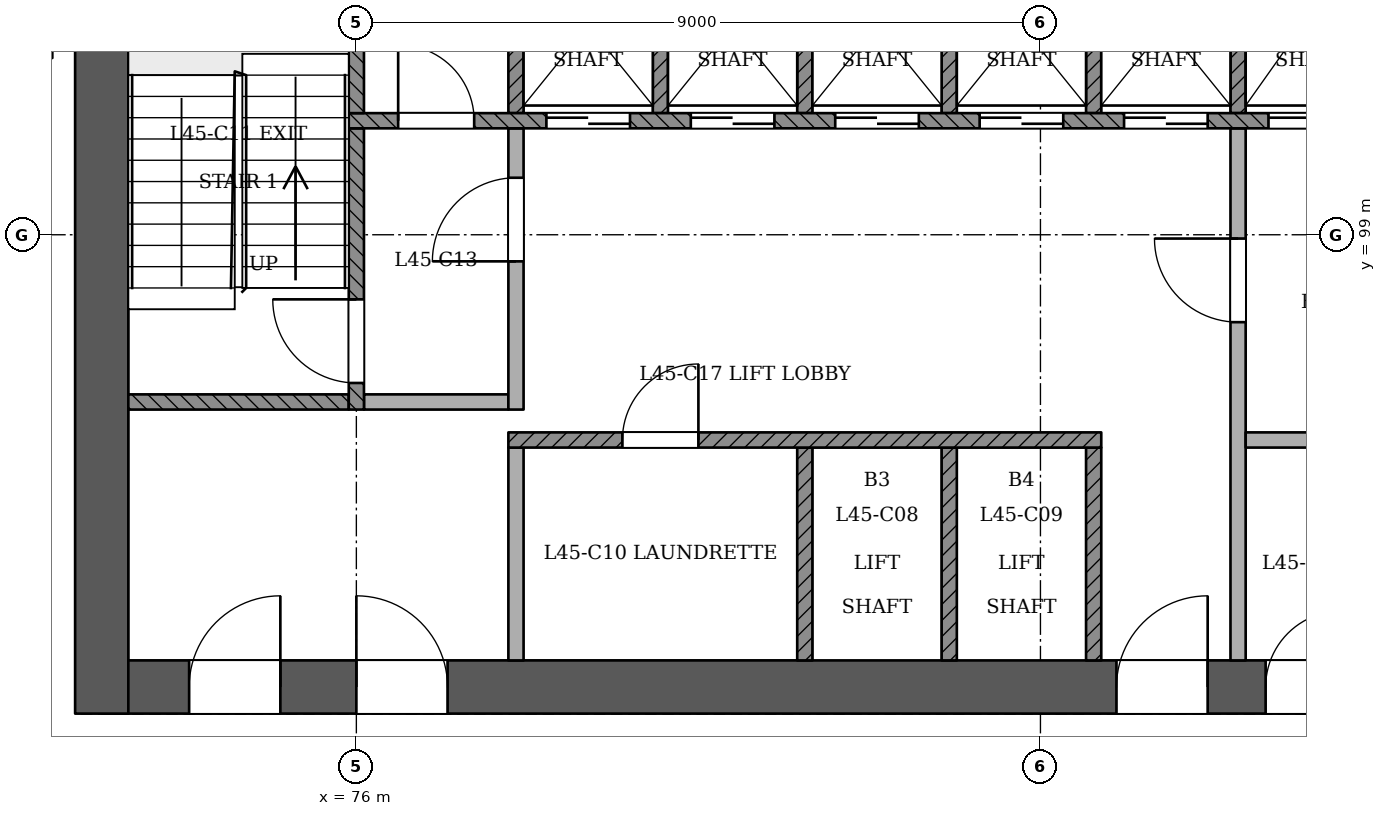
"""IFC4 building model, lengths in metres.
Left out: names, types, materials, properties, quantities, classifications, styles, units other than length and angle.
Written with IfcOpenShell. Run it as: python <this file> out.ifc"""

import sys

from ifc_helpers import new_model, si_unit, direction, frame, frame_2d, origin, place, context, subcontext, project, spatial, rectangle, extrude, element, fill, save


model = new_model("IFC4")
c1 = context("Model", 3, precision=1e-05, world=origin(), true_north=direction((0.0, 1.0)))
c2 = subcontext(c1, "Body", "Model", "MODEL_VIEW")
j1 = project(units=[si_unit("LENGTHUNIT", "METRE"), si_unit("PLANEANGLEUNIT", "RADIAN")], contexts=[c1])
p1 = place(None, origin())
s1 = spatial("IfcSite", under=j1, at=p1, CompositionType="ELEMENT")
p2 = place(p1, origin())
s2 = spatial("IfcBuilding", under=s1, at=p2, CompositionType="ELEMENT")
p3 = place(p2, frame((0.0, 0.0, 174.6)))
s3 = spatial("IfcBuildingStorey", under=s2, at=p3, CompositionType="ELEMENT", Elevation=174.6)
p4 = place(p3, frame((72.65, 93.05, 0.0), z_axis=(0.0, 0.0, 1.0), x_axis=(1.0, 0.0, 0.0)))
e1 = element("IfcWall", 1, at=p4, inside=s3, PredefinedType="SHEAR", context=c2, shape_type="SweptSolid", body=[
    extrude(rectangle(XDim=25.05, YDim=0.7, at=frame_2d((12.525, 0.0))), origin(), (0.0, 0.0, 1.0), 3.6),
])
p5 = place(p4, frame((1.15, 0.0, 0.0)))
e2 = element("IfcOpeningElement", 2, at=p5, cuts=e1, PredefinedType="OPENING", context=c2, shape_type="SweptSolid", body=[
    extrude(rectangle(XDim=1.2, YDim=2.1, at=frame_2d((0.6, 1.05))), frame((0.0, 0.36, 0.0), z_axis=(0.0, -1.0, 0.0), x_axis=(1.0, 0.0, 0.0)), (0.0, 0.0, 1.0), 0.721),
])
p6 = place(p4, frame((3.35, 0.0, 0.0)))
e3 = element("IfcOpeningElement", 3, at=p6, cuts=e1, PredefinedType="OPENING", context=c2, shape_type="SweptSolid", body=[
    extrude(rectangle(XDim=1.2, YDim=2.1, at=frame_2d((0.6, 1.05))), frame((0.0, 0.36, 0.0), z_axis=(0.0, -1.0, 0.0), x_axis=(1.0, 0.0, 0.0)), (0.0, 0.0, 1.0), 0.721),
])
p7 = place(p4, frame((13.35, 0.0, 0.0)))
e4 = element("IfcOpeningElement", 4, at=p7, cuts=e1, PredefinedType="OPENING", context=c2, shape_type="SweptSolid", body=[
    extrude(rectangle(XDim=1.2, YDim=2.1, at=frame_2d((0.6, 1.05))), frame((0.0, 0.36, 0.0), z_axis=(0.0, -1.0, 0.0), x_axis=(1.0, 0.0, 0.0)), (0.0, 0.0, 1.0), 0.721),
])
p8 = place(p4, frame((15.312, 0.0, 0.0)))
e5 = element("IfcOpeningElement", 5, at=p8, cuts=e1, PredefinedType="OPENING", context=c2, shape_type="SweptSolid", body=[
    extrude(rectangle(XDim=1.0, YDim=2.1, at=frame_2d((0.5, 1.05))), frame((0.0, 0.36, 0.0), z_axis=(0.0, -1.0, 0.0), x_axis=(1.0, 0.0, 0.0)), (0.0, 0.0, 1.0), 0.721),
])
p9 = place(p4, frame((18.15, 0.0, 0.0)))
e6 = element("IfcOpeningElement", 6, at=p9, cuts=e1, PredefinedType="OPENING", context=c2, shape_type="SweptSolid", body=[
    extrude(rectangle(XDim=1.0, YDim=2.1, at=frame_2d((0.5, 1.05))), frame((0.0, 0.36, 0.0), z_axis=(0.0, -1.0, 0.0), x_axis=(1.0, 0.0, 0.0)), (0.0, 0.0, 1.0), 0.721),
])
p10 = place(p4, frame((21.05, 0.0, 0.0)))
e7 = element("IfcOpeningElement", 7, at=p10, cuts=e1, PredefinedType="OPENING", context=c2, shape_type="SweptSolid", body=[
    extrude(rectangle(XDim=1.0, YDim=2.1, at=frame_2d((0.5, 1.05))), frame((0.0, 0.36, 0.0), z_axis=(0.0, -1.0, 0.0), x_axis=(1.0, 0.0, 0.0)), (0.0, 0.0, 1.0), 0.721),
])
p11 = place(p4, frame((22.938, 0.0, 0.0)))
e8 = element("IfcOpeningElement", 8, at=p11, cuts=e1, PredefinedType="OPENING", context=c2, shape_type="SweptSolid", body=[
    extrude(rectangle(XDim=1.0, YDim=2.1, at=frame_2d((0.5, 1.05))), frame((0.0, 0.36, 0.0), z_axis=(0.0, -1.0, 0.0), x_axis=(1.0, 0.0, 0.0)), (0.0, 0.0, 1.0), 0.721),
])
p12 = place(p3, frame((72.65, 103.75, 0.0), z_axis=(0.0, 0.0, 1.0), x_axis=(0.0, -1.0, 0.0)))
e9 = element("IfcWall", 9, at=p12, inside=s3, PredefinedType="SHEAR", context=c2, shape_type="SweptSolid", body=[
    extrude(rectangle(XDim=11.05, YDim=0.7, at=frame_2d((5.525, 0.0))), origin(), (0.0, 0.0, 1.0), 3.6),
])
p13 = place(p3, frame((78.1, 93.4, 0.0), z_axis=(0.0, 0.0, 1.0), x_axis=(0.0, 1.0, 0.0)))
e10 = element("IfcWall", 10, at=p13, inside=s3, PredefinedType="PARTITIONING", context=c2, shape_type="SweptSolid", body=[
    extrude(rectangle(XDim=2.8, YDim=0.2, at=frame_2d((1.4, 0.0))), origin(), (0.0, 0.0, 1.0), 3.15),
])
for number, where, z_axis, x_axis in (
    (11, (81.9, 93.4, 0.0), (0.0, 0.0, 1.0), (0.0, 1.0, 0.0)),
    (12, (83.8, 93.4, 0.0), (0.0, 0.0, 1.0), (0.0, 1.0, 0.0)),
    (13, (85.7, 93.4, 0.0), (0.0, 0.0, 1.0), (0.0, 1.0, 0.0)),
):
    element("IfcWall", number, at=place(p3, frame(where, z_axis=z_axis, x_axis=x_axis)), inside=s3, PredefinedType="SOLIDWALL", context=c2, shape_type="SweptSolid", body=[
        extrude(rectangle(XDim=2.8, YDim=0.2, at=frame_2d((1.4, 0.0))), origin(), (0.0, 0.0, 1.0), 3.15),
    ])
p14 = place(p3, frame((87.6, 93.4, 0.0), z_axis=(0.0, 0.0, 1.0), x_axis=(0.0, 1.0, 0.0)))
e14 = element("IfcWall", 14, at=p14, inside=s3, PredefinedType="PARTITIONING", context=c2, shape_type="SweptSolid", body=[
    extrude(rectangle(XDim=7.0, YDim=0.2, at=frame_2d((3.5, 0.0))), origin(), (0.0, 0.0, 1.0), 3.15),
])
p15 = place(p14, frame((4.45, 0.0, 0.0)))
e15 = element("IfcOpeningElement", 15, at=p15, cuts=e14, PredefinedType="OPENING", context=c2, shape_type="SweptSolid", body=[
    extrude(rectangle(XDim=1.1, YDim=2.1, at=frame_2d((0.55, 1.05))), frame((0.0, 0.11, 0.0), z_axis=(0.0, -1.0, 0.0), x_axis=(1.0, 0.0, 0.0)), (0.0, 0.0, 1.0), 0.221),
])
p16 = place(p3, frame((78.0, 96.3, 0.0), z_axis=(0.0, 0.0, 1.0), x_axis=(1.0, 0.0, 0.0)))
e16 = element("IfcWall", 16, at=p16, inside=s3, PredefinedType="SOLIDWALL", context=c2, shape_type="SweptSolid", body=[
    extrude(rectangle(XDim=7.8, YDim=0.2, at=frame_2d((3.9, 0.0))), origin(), (0.0, 0.0, 1.0), 3.15),
])
p17 = place(p16, frame((1.5, 0.0, 0.0)))
e17 = element("IfcOpeningElement", 17, at=p17, cuts=e16, PredefinedType="OPENING", context=c2, shape_type="SweptSolid", body=[
    extrude(rectangle(XDim=1.0, YDim=2.1, at=frame_2d((0.5, 1.05))), frame((0.0, 0.11, 0.0), z_axis=(0.0, -1.0, 0.0), x_axis=(1.0, 0.0, 0.0)), (0.0, 0.0, 1.0), 0.221),
])
p18 = place(p3, frame((87.7, 96.3, 0.0), z_axis=(0.0, 0.0, 1.0), x_axis=(1.0, 0.0, 0.0)))
e18 = element("IfcWall", 18, at=p18, inside=s3, PredefinedType="PARTITIONING", context=c2, shape_type="SweptSolid", body=[
    extrude(rectangle(XDim=3.6, YDim=0.2, at=frame_2d((1.8, 0.0))), origin(), (0.0, 0.0, 1.0), 3.15),
])
p19 = place(p3, frame((73.0, 96.8, 0.0), z_axis=(0.0, 0.0, 1.0), x_axis=(1.0, 0.0, 0.0)))
e19 = element("IfcWall", 19, at=p19, inside=s3, PredefinedType="SOLIDWALL", context=c2, shape_type="SweptSolid", body=[
    extrude(rectangle(XDim=2.9, YDim=0.2, at=frame_2d((1.45, 0.0))), origin(), (0.0, 0.0, 1.0), 3.15),
])
p20 = place(p3, frame((76.0, 96.7, 0.0), z_axis=(0.0, 0.0, 1.0), x_axis=(0.0, 1.0, 0.0)))
e20 = element("IfcWall", 20, at=p20, inside=s3, PredefinedType="SOLIDWALL", context=c2, shape_type="SweptSolid", body=[
    extrude(rectangle(XDim=3.7, YDim=0.2, at=frame_2d((1.85, 0.0))), origin(), (0.0, 0.0, 1.0), 3.15),
])
p21 = place(p20, frame((0.35, 0.0, 0.0)))
e21 = element("IfcOpeningElement", 21, at=p21, cuts=e20, PredefinedType="OPENING", context=c2, shape_type="SweptSolid", body=[
    extrude(rectangle(XDim=1.1, YDim=2.1, at=frame_2d((0.55, 1.05))), frame((0.0, 0.11, 0.0), z_axis=(0.0, -1.0, 0.0), x_axis=(1.0, 0.0, 0.0)), (0.0, 0.0, 1.0), 0.221),
])
p22 = place(p3, frame((76.1, 96.8, 0.0), z_axis=(0.0, 0.0, 1.0), x_axis=(1.0, 0.0, 0.0)))
e22 = element("IfcWall", 22, at=p22, inside=s3, PredefinedType="PARTITIONING", context=c2, shape_type="SweptSolid", body=[
    extrude(rectangle(XDim=1.9, YDim=0.2, at=frame_2d((0.95, 0.0))), origin(), (0.0, 0.0, 1.0), 3.15),
])
p23 = place(p3, frame((78.1, 96.7, 0.0), z_axis=(0.0, 0.0, 1.0), x_axis=(0.0, 1.0, 0.0)))
e23 = element("IfcWall", 23, at=p23, inside=s3, PredefinedType="PARTITIONING", context=c2, shape_type="SweptSolid", body=[
    extrude(rectangle(XDim=3.7, YDim=0.2, at=frame_2d((1.85, 0.0))), origin(), (0.0, 0.0, 1.0), 3.15),
])
p24 = place(p23, frame((1.95, 0.0, 0.0)))
e24 = element("IfcOpeningElement", 24, at=p24, cuts=e23, PredefinedType="OPENING", context=c2, shape_type="SweptSolid", body=[
    extrude(rectangle(XDim=1.1, YDim=2.1, at=frame_2d((0.55, 1.05))), frame((0.0, 0.11, 0.0), z_axis=(0.0, -1.0, 0.0), x_axis=(1.0, 0.0, 0.0)), (0.0, 0.0, 1.0), 0.221),
])
p25 = place(p3, frame((75.9, 100.5, 0.0), z_axis=(0.0, 0.0, 1.0), x_axis=(1.0, 0.0, 0.0)))
e25 = element("IfcWall", 25, at=p25, inside=s3, PredefinedType="SOLIDWALL", context=c2, shape_type="SweptSolid", body=[
    extrude(rectangle(XDim=18.2, YDim=0.2, at=frame_2d((9.1, 0.0))), origin(), (0.0, 0.0, 1.0), 3.15),
])
p26 = place(p25, frame((2.6, 0.0, 0.0)))
e26 = element("IfcOpeningElement", 26, at=p26, cuts=e25, PredefinedType="OPENING", context=c2, shape_type="SweptSolid", body=[
    extrude(rectangle(XDim=1.1, YDim=2.1, at=frame_2d((0.55, 1.05))), frame((0.0, 0.11, 0.0), z_axis=(0.0, -1.0, 0.0), x_axis=(1.0, 0.0, 0.0)), (0.0, 0.0, 1.0), 0.221),
])
p27 = place(p25, frame((4.5, 0.0, 0.0)))
e27 = element("IfcOpeningElement", 27, at=p27, cuts=e25, PredefinedType="OPENING", context=c2, shape_type="SweptSolid", body=[
    extrude(rectangle(XDim=1.1, YDim=2.1, at=frame_2d((0.55, 1.05))), frame((0.0, 0.11, 0.0), z_axis=(0.0, -1.0, 0.0), x_axis=(1.0, 0.0, 0.0)), (0.0, 0.0, 1.0), 0.221),
])
p28 = place(p25, frame((6.4, 0.0, 0.0)))
e28 = element("IfcOpeningElement", 28, at=p28, cuts=e25, PredefinedType="OPENING", context=c2, shape_type="SweptSolid", body=[
    extrude(rectangle(XDim=1.1, YDim=2.1, at=frame_2d((0.55, 1.05))), frame((0.0, 0.11, 0.0), z_axis=(0.0, -1.0, 0.0), x_axis=(1.0, 0.0, 0.0)), (0.0, 0.0, 1.0), 0.221),
])
p29 = place(p25, frame((8.3, 0.0, 0.0)))
e29 = element("IfcOpeningElement", 29, at=p29, cuts=e25, PredefinedType="OPENING", context=c2, shape_type="SweptSolid", body=[
    extrude(rectangle(XDim=1.1, YDim=2.1, at=frame_2d((0.55, 1.05))), frame((0.0, 0.11, 0.0), z_axis=(0.0, -1.0, 0.0), x_axis=(1.0, 0.0, 0.0)), (0.0, 0.0, 1.0), 0.221),
])
p30 = place(p25, frame((10.2, 0.0, 0.0)))
e30 = element("IfcOpeningElement", 30, at=p30, cuts=e25, PredefinedType="OPENING", context=c2, shape_type="SweptSolid", body=[
    extrude(rectangle(XDim=1.1, YDim=2.1, at=frame_2d((0.55, 1.05))), frame((0.0, 0.11, 0.0), z_axis=(0.0, -1.0, 0.0), x_axis=(1.0, 0.0, 0.0)), (0.0, 0.0, 1.0), 0.221),
])
p31 = place(p25, frame((12.1, 0.0, 0.0)))
e31 = element("IfcOpeningElement", 31, at=p31, cuts=e25, PredefinedType="OPENING", context=c2, shape_type="SweptSolid", body=[
    extrude(rectangle(XDim=1.1, YDim=2.1, at=frame_2d((0.55, 1.05))), frame((0.0, 0.11, 0.0), z_axis=(0.0, -1.0, 0.0), x_axis=(1.0, 0.0, 0.0)), (0.0, 0.0, 1.0), 0.221),
])
p32 = place(p25, frame((14.0, 0.0, 0.0)))
e32 = element("IfcOpeningElement", 32, at=p32, cuts=e25, PredefinedType="OPENING", context=c2, shape_type="SweptSolid", body=[
    extrude(rectangle(XDim=1.1, YDim=2.1, at=frame_2d((0.55, 1.05))), frame((0.0, 0.11, 0.0), z_axis=(0.0, -1.0, 0.0), x_axis=(1.0, 0.0, 0.0)), (0.0, 0.0, 1.0), 0.221),
])
p33 = place(p25, frame((0.65, 0.0, 0.0)))
e33 = element("IfcOpeningElement", 33, at=p33, cuts=e25, PredefinedType="OPENING", context=c2, shape_type="SweptSolid", body=[
    extrude(rectangle(XDim=1.0, YDim=2.1, at=frame_2d((0.5, 1.05))), frame((0.0, 0.11, 0.0), z_axis=(0.0, -1.0, 0.0), x_axis=(1.0, 0.0, 0.0)), (0.0, 0.0, 1.0), 0.221),
])
p34 = place(p25, frame((16.3, 0.0, 0.0)))
e34 = element("IfcOpeningElement", 34, at=p34, cuts=e25, PredefinedType="OPENING", context=c2, shape_type="SweptSolid", body=[
    extrude(rectangle(XDim=1.0, YDim=2.1, at=frame_2d((0.5, 1.05))), frame((0.0, 0.11, 0.0), z_axis=(0.0, -1.0, 0.0), x_axis=(1.0, 0.0, 0.0)), (0.0, 0.0, 1.0), 0.221),
])
for number, where, z_axis, x_axis in (
    (35, (76.0, 100.6, 0.0), (0.0, 0.0, 1.0), (0.0, 1.0, 0.0)),
    (36, (78.1, 100.6, 0.0), (0.0, 0.0, 1.0), (0.0, 1.0, 0.0)),
    (37, (80.0, 100.6, 0.0), (0.0, 0.0, 1.0), (0.0, 1.0, 0.0)),
    (38, (81.9, 100.6, 0.0), (0.0, 0.0, 1.0), (0.0, 1.0, 0.0)),
    (39, (83.8, 100.6, 0.0), (0.0, 0.0, 1.0), (0.0, 1.0, 0.0)),
    (40, (85.7, 100.6, 0.0), (0.0, 0.0, 1.0), (0.0, 1.0, 0.0)),
    (41, (87.6, 100.6, 0.0), (0.0, 0.0, 1.0), (0.0, 1.0, 0.0)),
):
    element("IfcWall", number, at=place(p3, frame(where, z_axis=z_axis, x_axis=x_axis)), inside=s3, PredefinedType="SOLIDWALL", context=c2, shape_type="SweptSolid", body=[
        extrude(rectangle(XDim=2.8, YDim=0.2, at=frame_2d((1.4, 0.0))), origin(), (0.0, 0.0, 1.0), 3.15),
    ])
p35 = place(p26, origin())
e42 = element("IfcDoor", 42, at=p35, inside=s3, OperationType="SLIDING_TO_RIGHT", PredefinedType="NOTDEFINED", context=c2, shape_type="SweptSolid", body=[
    extrude(rectangle(XDim=1.1, YDim=2.1, at=frame_2d((0.55, 1.05))), frame((0.0, 0.025, 0.0), z_axis=(0.0, -1.0, 0.0), x_axis=(1.0, 0.0, 0.0)), (0.0, 0.0, 1.0), 0.05),
])
fill(e26, e42)
p36 = place(p27, origin())
e43 = element("IfcDoor", 43, at=p36, inside=s3, OperationType="SLIDING_TO_LEFT", PredefinedType="NOTDEFINED", context=c2, shape_type="SweptSolid", body=[
    extrude(rectangle(XDim=1.1, YDim=2.1, at=frame_2d((0.55, 1.05))), frame((0.0, 0.025, 0.0), z_axis=(0.0, -1.0, 0.0), x_axis=(1.0, 0.0, 0.0)), (0.0, 0.0, 1.0), 0.05),
])
fill(e27, e43)
p37 = place(p28, origin())
e44 = element("IfcDoor", 44, at=p37, inside=s3, OperationType="SLIDING_TO_RIGHT", PredefinedType="NOTDEFINED", context=c2, shape_type="SweptSolid", body=[
    extrude(rectangle(XDim=1.1, YDim=2.1, at=frame_2d((0.55, 1.05))), frame((0.0, 0.025, 0.0), z_axis=(0.0, -1.0, 0.0), x_axis=(1.0, 0.0, 0.0)), (0.0, 0.0, 1.0), 0.05),
])
fill(e28, e44)
p38 = place(p29, origin())
e45 = element("IfcDoor", 45, at=p38, inside=s3, OperationType="SLIDING_TO_LEFT", PredefinedType="NOTDEFINED", context=c2, shape_type="SweptSolid", body=[
    extrude(rectangle(XDim=1.1, YDim=2.1, at=frame_2d((0.55, 1.05))), frame((0.0, 0.025, 0.0), z_axis=(0.0, -1.0, 0.0), x_axis=(1.0, 0.0, 0.0)), (0.0, 0.0, 1.0), 0.05),
])
fill(e29, e45)
p39 = place(p30, origin())
e46 = element("IfcDoor", 46, at=p39, inside=s3, OperationType="SLIDING_TO_RIGHT", PredefinedType="NOTDEFINED", context=c2, shape_type="SweptSolid", body=[
    extrude(rectangle(XDim=1.1, YDim=2.1, at=frame_2d((0.55, 1.05))), frame((0.0, 0.025, 0.0), z_axis=(0.0, -1.0, 0.0), x_axis=(1.0, 0.0, 0.0)), (0.0, 0.0, 1.0), 0.05),
])
fill(e30, e46)
p40 = place(p31, origin())
e47 = element("IfcDoor", 47, at=p40, inside=s3, OperationType="SLIDING_TO_RIGHT", PredefinedType="NOTDEFINED", context=c2, shape_type="SweptSolid", body=[
    extrude(rectangle(XDim=1.1, YDim=2.1, at=frame_2d((0.55, 1.05))), frame((0.0, 0.025, 0.0), z_axis=(0.0, -1.0, 0.0), x_axis=(1.0, 0.0, 0.0)), (0.0, 0.0, 1.0), 0.05),
])
fill(e31, e47)
p41 = place(p21, origin())
e48 = element("IfcDoor", 48, at=p41, inside=s3, OperationType="SINGLE_SWING_RIGHT", PredefinedType="NOTDEFINED", context=c2, shape_type="SweptSolid", body=[
    extrude(rectangle(XDim=1.1, YDim=2.1, at=frame_2d((0.55, 1.05))), frame((0.0, 0.025, 0.0), z_axis=(0.0, -1.0, 0.0), x_axis=(1.0, 0.0, 0.0)), (0.0, 0.0, 1.0), 0.05),
])
fill(e21, e48)
p42 = place(p24, origin())
e49 = element("IfcDoor", 49, at=p42, inside=s3, OperationType="SINGLE_SWING_LEFT", PredefinedType="NOTDEFINED", context=c2, shape_type="SweptSolid", body=[
    extrude(rectangle(XDim=1.1, YDim=2.1, at=frame_2d((0.55, 1.05))), frame((0.0, 0.025, 0.0), z_axis=(0.0, -1.0, 0.0), x_axis=(1.0, 0.0, 0.0)), (0.0, 0.0, 1.0), 0.05),
])
fill(e24, e49)
p43 = place(p15, origin())
e50 = element("IfcDoor", 50, at=p43, inside=s3, OperationType="SINGLE_SWING_RIGHT", PredefinedType="NOTDEFINED", context=c2, shape_type="SweptSolid", body=[
    extrude(rectangle(XDim=1.1, YDim=2.1, at=frame_2d((0.55, 1.05))), frame((0.0, 0.025, 0.0), z_axis=(0.0, -1.0, 0.0), x_axis=(1.0, 0.0, 0.0)), (0.0, 0.0, 1.0), 0.05),
])
fill(e15, e50)
p44 = place(p5, origin())
e51 = element("IfcDoor", 51, at=p44, inside=s3, OperationType="SINGLE_SWING_RIGHT", PredefinedType="NOTDEFINED", context=c2, shape_type="SweptSolid", body=[
    extrude(rectangle(XDim=1.2, YDim=2.1, at=frame_2d((0.6, 1.05))), frame((0.0, 0.025, 0.0), z_axis=(0.0, -1.0, 0.0), x_axis=(1.0, 0.0, 0.0)), (0.0, 0.0, 1.0), 0.05),
])
fill(e2, e51)
p45 = place(p6, origin())
e52 = element("IfcDoor", 52, at=p45, inside=s3, OperationType="SINGLE_SWING_LEFT", PredefinedType="NOTDEFINED", context=c2, shape_type="SweptSolid", body=[
    extrude(rectangle(XDim=1.2, YDim=2.1, at=frame_2d((0.6, 1.05))), frame((0.0, 0.025, 0.0), z_axis=(0.0, -1.0, 0.0), x_axis=(1.0, 0.0, 0.0)), (0.0, 0.0, 1.0), 0.05),
])
fill(e3, e52)
p46 = place(p7, origin())
e53 = element("IfcDoor", 53, at=p46, inside=s3, OperationType="SINGLE_SWING_RIGHT", PredefinedType="NOTDEFINED", context=c2, shape_type="SweptSolid", body=[
    extrude(rectangle(XDim=1.2, YDim=2.1, at=frame_2d((0.6, 1.05))), frame((0.0, 0.025, 0.0), z_axis=(0.0, -1.0, 0.0), x_axis=(1.0, 0.0, 0.0)), (0.0, 0.0, 1.0), 0.05),
])
fill(e4, e53)
p47 = place(p33, origin())
e54 = element("IfcDoor", 54, at=p47, inside=s3, OperationType="SINGLE_SWING_LEFT", PredefinedType="NOTDEFINED", context=c2, shape_type="SweptSolid", body=[
    extrude(rectangle(XDim=1.0, YDim=2.1, at=frame_2d((0.5, 1.05))), frame((0.0, 0.025, 0.0), z_axis=(0.0, -1.0, 0.0), x_axis=(1.0, 0.0, 0.0)), (0.0, 0.0, 1.0), 0.05),
])
fill(e33, e54)
p48 = place(p8, origin())
e55 = element("IfcDoor", 55, at=p48, inside=s3, OperationType="SINGLE_SWING_RIGHT", PredefinedType="NOTDEFINED", context=c2, shape_type="SweptSolid", body=[
    extrude(rectangle(XDim=1.0, YDim=2.1, at=frame_2d((0.5, 1.05))), frame((0.0, 0.025, 0.0), z_axis=(0.0, -1.0, 0.0), x_axis=(1.0, 0.0, 0.0)), (0.0, 0.0, 1.0), 0.05),
])
fill(e5, e55)
p49 = place(p17, origin())
e56 = element("IfcDoor", 56, at=p49, inside=s3, OperationType="SINGLE_SWING_RIGHT", PredefinedType="NOTDEFINED", context=c2, shape_type="SweptSolid", body=[
    extrude(rectangle(XDim=1.0, YDim=2.1, at=frame_2d((0.5, 1.05))), frame((0.0, 0.025, 0.0), z_axis=(0.0, -1.0, 0.0), x_axis=(1.0, 0.0, 0.0)), (0.0, 0.0, 1.0), 0.05),
])
fill(e17, e56)
save(model, sys.argv[1])
